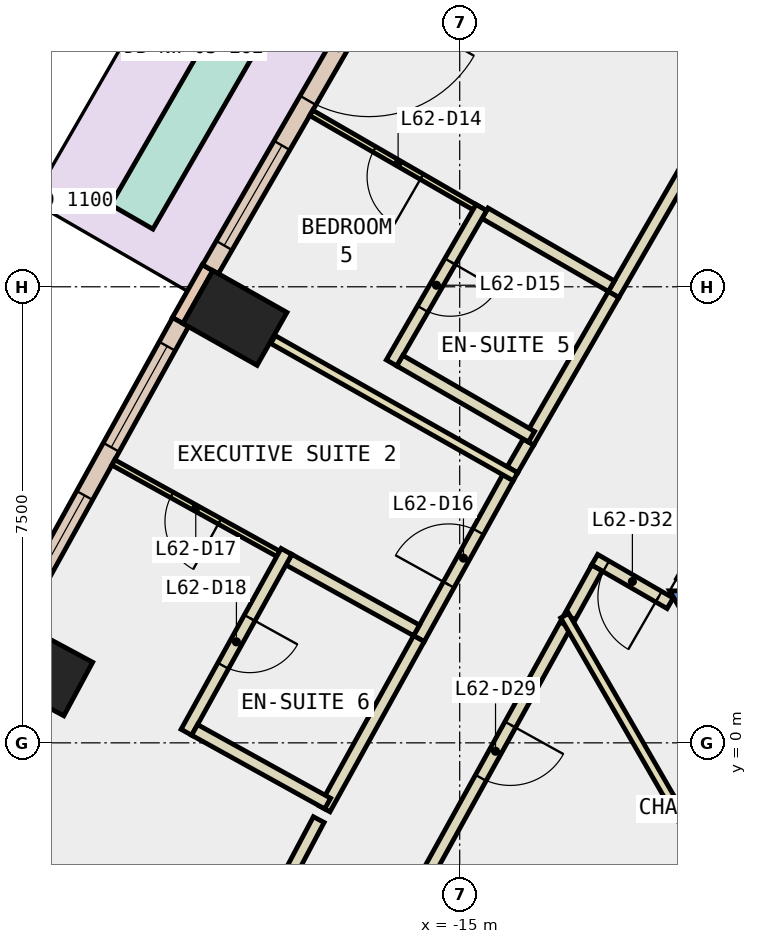
"""IFC4 building model, lengths in metres.
Left out: names, types, materials, properties, quantities, classifications, styles, units other than length and angle.
Written with IfcOpenShell. Run it as: python <this file> out.ifc"""

import sys

from ifc_helpers import new_model, si_unit, direction, frame, frame_2d, origin, origin_2d, place, context, subcontext, project, spatial, polyline, rectangle, outline, extrude, element, fill, save


model = new_model("IFC4")
c1 = context("Model", 3, precision=1e-05, world=origin(), true_north=direction((0.0, 1.0)))
c2 = subcontext(c1, "Body", "Model", "MODEL_VIEW")
j1 = project(units=[si_unit("LENGTHUNIT", "METRE"), si_unit("PLANEANGLEUNIT", "RADIAN")], contexts=[c1])
p1 = place(None, origin())
s1 = spatial("IfcSite", under=j1, at=p1, CompositionType="ELEMENT")
p2 = place(p1, origin())
s2 = spatial("IfcBuilding", under=s1, at=p2, CompositionType="ELEMENT")
p3 = place(p2, frame((0.0, 0.0, 270.2)))
s3 = spatial("IfcBuildingStorey", under=s2, at=p3, CompositionType="ELEMENT", Elevation=270.2)
for number, where, z_axis, x_axis in (
    (1, (-18.696, 6.987, -0.34), (0.0, 0.0, 1.0), (0.491, 0.871, 0.0)),
    (2, (-21.89, 1.217, -0.34), (0.0, 0.0, 1.0), (0.474, 0.881, 0.0)),
):
    element("IfcColumn", number, at=place(p3, frame(where, z_axis=z_axis, x_axis=x_axis)), inside=s3, PredefinedType="COLUMN", context=c2, shape_type="SweptSolid", body=[
        extrude(rectangle(XDim=1.0, YDim=1.4, at=origin_2d()), origin(), (0.0, 0.0, 1.0), 3.6),
    ])
p4 = place(p3, frame((0.0, 0.0, -0.34)))
e3 = element("IfcWall", 3, at=p4, inside=s3, PredefinedType="SHEAR", context=c2, shape_type="SweptSolid", body=[
    extrude(outline(polyline([(-11.547, 2.5), (-5.774, -7.5), (-5.427, -6.9), (-10.854, 2.5), (-11.547, 2.5)])), origin(), (0.0, 0.0, 1.0), 3.6),
])
p5 = place(p3, frame((-19.147, 7.815, 0.0), z_axis=(0.0, 0.0, 1.0), x_axis=(-0.491848119507, -0.870681013539, 0.0)))
e4 = element("IfcWall", 4, at=p5, inside=s3, PredefinedType="STANDARD", context=c2, shape_type="SweptSolid", body=[
    extrude(rectangle(XDim=1.0, YDim=0.2, at=frame_2d((0.5, 0.0))), origin(), (0.0, 0.0, 1.0), 3.26),
])
p6 = place(p3, frame((-16.294, 12.647, 0.0), z_axis=(0.0, 0.0, 1.0), x_axis=(-0.500041292042, -0.866001562501, 0.0)))
e5 = element("IfcWall", 5, at=p6, inside=s3, PredefinedType="STANDARD", context=c2, shape_type="SweptSolid", body=[
    extrude(rectangle(XDim=5.612, YDim=0.3, at=frame_2d((2.806, 0.0))), origin(), (0.0, 0.0, 1.0), 3.26),
])
p7 = place(p6, frame((0.403, 0.0, 0.0)))
e6 = element("IfcOpeningElement", 6, at=p7, cuts=e5, PredefinedType="OPENING", context=c2, shape_type="SweptSolid", body=[
    extrude(rectangle(XDim=2.0, YDim=2.4, at=frame_2d((1.0, 1.2))), frame((0.0, 0.16, 0.0), z_axis=(0.0, -1.0, 0.0), x_axis=(1.0, 0.0, 0.0)), (0.0, 0.0, 1.0), 0.32),
])
p8 = place(p6, frame((3.259, 0.0, 0.9)))
e7 = element("IfcOpeningElement", 7, at=p8, cuts=e5, PredefinedType="OPENING", context=c2, shape_type="SweptSolid", body=[
    extrude(rectangle(XDim=1.9, YDim=2.0, at=frame_2d((0.95, 1.0))), frame((0.0, 0.16, 0.0), z_axis=(0.0, -1.0, 0.0), x_axis=(1.0, 0.0, 0.0)), (0.0, 0.0, 1.0), 0.32),
])
p9 = place(p3, frame((-19.591, 6.919, 0.0), z_axis=(0.0, 0.0, 1.0), x_axis=(-0.484260568952, -0.874923826032, 0.0)))
e8 = element("IfcWall", 8, at=p9, inside=s3, PredefinedType="STANDARD", context=c2, shape_type="SweptSolid", body=[
    extrude(rectangle(XDim=5.611, YDim=0.3, at=frame_2d((2.805, 0.0))), origin(), (0.0, 0.0, 1.0), 3.26),
])
p10 = place(p9, frame((0.453, 0.0, 0.9)))
e9 = element("IfcOpeningElement", 9, at=p10, cuts=e8, PredefinedType="OPENING", context=c2, shape_type="SweptSolid", body=[
    extrude(rectangle(XDim=1.9, YDim=2.0, at=frame_2d((0.95, 1.0))), frame((0.0, 0.16, 0.0), z_axis=(0.0, -1.0, 0.0), x_axis=(1.0, 0.0, 0.0)), (0.0, 0.0, 1.0), 0.32),
])
p11 = place(p9, frame((3.258, 0.0, 0.9)))
e10 = element("IfcOpeningElement", 10, at=p11, cuts=e8, PredefinedType="OPENING", context=c2, shape_type="SweptSolid", body=[
    extrude(rectangle(XDim=1.9, YDim=2.0, at=frame_2d((0.95, 1.0))), frame((0.0, 0.16, 0.0), z_axis=(0.0, -1.0, 0.0), x_axis=(1.0, 0.0, 0.0)), (0.0, 0.0, 1.0), 0.32),
])
p12 = place(p3, frame((-17.686, 13.335, 0.0), z_axis=(0.0, 0.0, 1.0), x_axis=(-0.500079142514, -0.865979706011, 0.0)))
e11 = element("IfcWall", 11, at=p12, inside=s3, PredefinedType="STANDARD", context=c2, shape_type="SweptSolid", body=[
    extrude(rectangle(XDim=5.411, YDim=0.8, at=frame_2d((2.706, 0.0))), origin(), (0.0, 0.0, 1.0), 0.8),
])
p13 = place(p3, frame((-11.539, 2.295, 0.0), z_axis=(0.0, 0.0, 1.0), x_axis=(-0.866023989838, 0.500002449018, 0.0)))
e12 = element("IfcWall", 12, at=p13, inside=s3, PredefinedType="PARTITIONING", context=c2, shape_type="SweptSolid", body=[
    extrude(rectangle(XDim=1.434, YDim=0.2, at=frame_2d((0.717, 0.0))), origin(), (0.0, 0.0, 1.0), 3.26),
])
p14 = place(p13, frame((0.217, 0.0, 0.0)))
e13 = element("IfcOpeningElement", 13, at=p14, cuts=e12, PredefinedType="OPENING", context=c2, shape_type="SweptSolid", body=[
    extrude(rectangle(XDim=1.0, YDim=2.1, at=frame_2d((0.5, 1.05))), frame((0.0, 0.11, 0.0), z_axis=(0.0, -1.0, 0.0), x_axis=(1.0, 0.0, 0.0)), (0.0, 0.0, 1.0), 0.22),
])
p15 = place(p3, frame((-12.743, 2.875, 0.0), z_axis=(0.0, 0.0, 1.0), x_axis=(-0.484334040176, -0.8748831565, 0.0)))
e14 = element("IfcWall", 14, at=p15, inside=s3, PredefinedType="PARTITIONING", context=c2, shape_type="SweptSolid", body=[
    extrude(rectangle(XDim=0.919, YDim=0.2, at=frame_2d((0.459, 0.0))), origin(), (0.0, 0.0, 1.0), 3.26),
])
p16 = place(p3, frame((-13.261, 1.939, 0.0), z_axis=(0.0, 0.0, 1.0), x_axis=(-0.484323615817, -0.874888927329, 0.0)))
e15 = element("IfcWall", 15, at=p16, inside=s3, PredefinedType="PARTITIONING", context=c2, shape_type="SweptSolid", body=[
    extrude(rectangle(XDim=4.747, YDim=0.2, at=frame_2d((2.374, 0.0))), origin(), (0.0, 0.0, 1.0), 3.26),
])
p17 = place(p16, frame((1.874, 0.0, 0.0)))
e16 = element("IfcOpeningElement", 16, at=p17, cuts=e15, PredefinedType="OPENING", context=c2, shape_type="SweptSolid", body=[
    extrude(rectangle(XDim=1.0, YDim=2.1, at=frame_2d((0.5, 1.05))), frame((0.0, 0.11, 0.0), z_axis=(0.0, -1.0, 0.0), x_axis=(1.0, 0.0, 0.0)), (0.0, 0.0, 1.0), 0.22),
])
p18 = place(p3, frame((-12.469, 7.373, 0.0), z_axis=(0.0, 0.0, 1.0), x_axis=(0.500129289791, 0.86595074542, 0.0)))
e17 = element("IfcWall", 17, at=p18, inside=s3, PredefinedType="PARTITIONING", context=c2, shape_type="SweptSolid", body=[
    extrude(rectangle(XDim=3.099, YDim=0.2, at=frame_2d((1.55, 0.0))), origin(), (0.0, 0.0, 1.0), 3.26),
])
p19 = place(p3, frame((-14.132, 4.492, 0.0), z_axis=(0.0, 0.0, 1.0), x_axis=(0.499829488579, 0.86612382622, 0.0)))
e18 = element("IfcWall", 18, at=p19, inside=s3, PredefinedType="PARTITIONING", context=c2, shape_type="SweptSolid", body=[
    extrude(rectangle(XDim=0.527, YDim=0.2, at=frame_2d((0.263, 0.0))), origin(), (0.0, 0.0, 1.0), 3.26),
])
p20 = place(p3, frame((-13.869, 4.948, 0.0), z_axis=(0.0, 0.0, 1.0), x_axis=(0.49994636267, 0.866056369097, 0.0)))
e19 = element("IfcWall", 19, at=p20, inside=s3, PredefinedType="PARTITIONING", context=c2, shape_type="SweptSolid", body=[
    extrude(rectangle(XDim=2.8, YDim=0.2, at=frame_2d((1.4, 0.0))), origin(), (0.0, 0.0, 1.0), 3.26),
])
p21 = place(p3, frame((-15.671, 1.714, 0.0), z_axis=(0.0, 0.0, 1.0), x_axis=(0.484203367026, 0.874955484216, 0.0)))
e20 = element("IfcWall", 20, at=p21, inside=s3, PredefinedType="PARTITIONING", context=c2, shape_type="SweptSolid", body=[
    extrude(rectangle(XDim=3.025, YDim=0.2, at=frame_2d((1.513, 0.0))), origin(), (0.0, 0.0, 1.0), 3.26),
])
p22 = place(p21, frame((1.013, 0.0, 0.0)))
e21 = element("IfcOpeningElement", 21, at=p22, cuts=e20, PredefinedType="OPENING", context=c2, shape_type="SweptSolid", body=[
    extrude(rectangle(XDim=1.0, YDim=2.1, at=frame_2d((0.5, 1.05))), frame((0.0, 0.11, 0.0), z_axis=(0.0, -1.0, 0.0), x_axis=(1.0, 0.0, 0.0)), (0.0, 0.0, 1.0), 0.22),
])
p23 = place(p3, frame((-20.229, -6.754, 0.0), z_axis=(0.0, 0.0, 1.0), x_axis=(0.468313568794, 0.883562335822, 0.0)))
e22 = element("IfcWall", 22, at=p23, inside=s3, PredefinedType="PARTITIONING", context=c2, shape_type="SweptSolid", body=[
    extrude(rectangle(XDim=6.216, YDim=0.2, at=frame_2d((3.108, 0.0))), origin(), (0.0, 0.0, 1.0), 3.26),
])
p24 = place(p3, frame((-17.221, -1.085, 0.0), z_axis=(0.0, 0.0, 1.0), x_axis=(0.48445041864, 0.874818719438, 0.0)))
e23 = element("IfcWall", 23, at=p24, inside=s3, PredefinedType="PARTITIONING", context=c2, shape_type="SweptSolid", body=[
    extrude(rectangle(XDim=3.2, YDim=0.2, at=frame_2d((1.6, 0.0))), origin(), (0.0, 0.0, 1.0), 3.26),
])
p25 = place(p3, frame((-13.274, 2.092, 0.0), z_axis=(0.0, 0.0, 1.0), x_axis=(0.500002592159, -0.866023907196, 0.0)))
e24 = element("IfcWall", 24, at=p25, inside=s3, PredefinedType="PARTITIONING", context=c2, shape_type="SweptSolid", body=[
    extrude(rectangle(XDim=6.538, YDim=0.15, at=frame_2d((3.269, 0.0))), origin(), (0.0, 0.0, 1.0), 3.26),
])
p26 = place(p3, frame((-14.584, 8.71, 0.0), z_axis=(0.0, 0.0, 1.0), x_axis=(-0.866008176907, 0.50002983664, 0.0)))
e25 = element("IfcWall", 25, at=p26, inside=s3, PredefinedType="PARTITIONING", context=c2, shape_type="SweptSolid", body=[
    extrude(rectangle(XDim=3.3, YDim=0.1, at=frame_2d((1.65, 0.0))), origin(), (0.0, 0.0, 1.0), 3.26),
])
p27 = place(p26, frame((1.2, 0.0, 0.0)))
e26 = element("IfcOpeningElement", 26, at=p27, cuts=e25, PredefinedType="OPENING", context=c2, shape_type="SweptSolid", body=[
    extrude(rectangle(XDim=0.9, YDim=2.1, at=frame_2d((0.45, 1.05))), frame((0.0, 0.06, 0.0), z_axis=(0.0, -1.0, 0.0), x_axis=(1.0, 0.0, 0.0)), (0.0, 0.0, 1.0), 0.12),
])
p28 = place(p3, frame((-12.505, 7.51, 0.0), z_axis=(0.0, 0.0, 1.0), x_axis=(-0.866277021052, 0.499563932643, 0.0)))
e27 = element("IfcWall", 27, at=p28, inside=s3, PredefinedType="PARTITIONING", context=c2, shape_type="SweptSolid", body=[
    extrude(rectangle(XDim=2.4, YDim=0.2, at=frame_2d((1.2, 0.0))), origin(), (0.0, 0.0, 1.0), 3.26),
])
p29 = place(p3, frame((-14.645, 8.803, 0.0), z_axis=(0.0, 0.0, 1.0), x_axis=(-0.500001826776, -0.866024349092, 0.0)))
e28 = element("IfcWall", 28, at=p29, inside=s3, PredefinedType="PARTITIONING", context=c2, shape_type="SweptSolid", body=[
    extrude(rectangle(XDim=2.95, YDim=0.2, at=frame_2d((1.475, 0.0))), origin(), (0.0, 0.0, 1.0), 3.26),
])
p30 = place(p29, frame((1.025, 0.0, 0.0)))
e29 = element("IfcOpeningElement", 29, at=p30, cuts=e28, PredefinedType="OPENING", context=c2, shape_type="SweptSolid", body=[
    extrude(rectangle(XDim=0.9, YDim=2.1, at=frame_2d((0.45, 1.05))), frame((0.0, 0.11, 0.0), z_axis=(0.0, -1.0, 0.0), x_axis=(1.0, 0.0, 0.0)), (0.0, 0.0, 1.0), 0.22),
])
p31 = place(p3, frame((-15.984, 6.285, 0.0), z_axis=(0.0, 0.0, 1.0), x_axis=(0.865998541277, -0.500046524342, 0.0)))
e30 = element("IfcWall", 30, at=p31, inside=s3, PredefinedType="PARTITIONING", context=c2, shape_type="SweptSolid", body=[
    extrude(rectangle(XDim=2.5, YDim=0.2, at=frame_2d((1.25, 0.0))), origin(), (0.0, 0.0, 1.0), 3.26),
])
p32 = place(p3, frame((-14.083, 4.377, 0.0), z_axis=(0.0, 0.0, 1.0), x_axis=(-0.870415885751, 0.492317159799, 0.0)))
e31 = element("IfcWall", 31, at=p32, inside=s3, PredefinedType="PARTITIONING", context=c2, shape_type="SweptSolid", body=[
    extrude(rectangle(XDim=4.581, YDim=0.15, at=frame_2d((2.29, 0.0))), origin(), (0.0, 0.0, 1.0), 3.26),
])
p33 = place(p3, frame((-17.985, 3.109, 0.0), z_axis=(0.0, 0.0, 1.0), x_axis=(-0.874762085098, 0.484552674614, 0.0)))
e32 = element("IfcWall", 32, at=p33, inside=s3, PredefinedType="PARTITIONING", context=c2, shape_type="SweptSolid", body=[
    extrude(rectangle(XDim=3.1, YDim=0.1, at=frame_2d((1.55, 0.0))), origin(), (0.0, 0.0, 1.0), 3.26),
])
p34 = place(p33, frame((1.1, 0.0, 0.0)))
e33 = element("IfcOpeningElement", 33, at=p34, cuts=e32, PredefinedType="OPENING", context=c2, shape_type="SweptSolid", body=[
    extrude(rectangle(XDim=0.9, YDim=2.1, at=frame_2d((0.45, 1.05))), frame((0.0, 0.06, 0.0), z_axis=(0.0, -1.0, 0.0), x_axis=(1.0, 0.0, 0.0)), (0.0, 0.0, 1.0), 0.12),
])
p35 = place(p3, frame((-15.71, 1.85, 0.0), z_axis=(0.0, 0.0, 1.0), x_axis=(-0.874842414173, 0.484407628308, 0.0)))
e34 = element("IfcWall", 34, at=p35, inside=s3, PredefinedType="PARTITIONING", context=c2, shape_type="SweptSolid", body=[
    extrude(rectangle(XDim=2.401, YDim=0.2, at=frame_2d((1.2, 0.0))), origin(), (0.0, 0.0, 1.0), 3.26),
])
p36 = place(p3, frame((-17.849, 3.148, 0.0), z_axis=(0.0, 0.0, 1.0), x_axis=(-0.484257957482, -0.874925271446, 0.0)))
e35 = element("IfcWall", 35, at=p36, inside=s3, PredefinedType="PARTITIONING", context=c2, shape_type="SweptSolid", body=[
    extrude(rectangle(XDim=3.399, YDim=0.2, at=frame_2d((1.699, 0.0))), origin(), (0.0, 0.0, 1.0), 3.26),
])
p37 = place(p36, frame((1.25, 0.0, 0.0)))
e36 = element("IfcOpeningElement", 36, at=p37, cuts=e35, PredefinedType="OPENING", context=c2, shape_type="SweptSolid", body=[
    extrude(rectangle(XDim=0.9, YDim=2.1, at=frame_2d((0.45, 1.05))), frame((0.0, 0.11, 0.0), z_axis=(0.0, -1.0, 0.0), x_axis=(1.0, 0.0, 0.0)), (0.0, 0.0, 1.0), 0.22),
])
p38 = place(p3, frame((-19.36, 0.213, 0.0), z_axis=(0.0, 0.0, 1.0), x_axis=(0.874939003568, -0.484233146362, 0.0)))
e37 = element("IfcWall", 37, at=p38, inside=s3, PredefinedType="PARTITIONING", context=c2, shape_type="SweptSolid", body=[
    extrude(rectangle(XDim=2.501, YDim=0.2, at=frame_2d((1.25, 0.0))), origin(), (0.0, 0.0, 1.0), 3.26),
])
p39 = place(p3, frame((-10.449, 4.203, 0.0), z_axis=(0.0, 0.0, 1.0), x_axis=(-0.499914839587, -0.866074565589, 0.0)))
e38 = element("IfcWall", 38, at=p39, inside=s3, PredefinedType="PARTITIONING", context=c2, shape_type="SweptSolid", body=[
    extrude(rectangle(XDim=1.794, YDim=0.2, at=frame_2d((0.897, 0.0))), origin(), (0.0, 0.0, 1.0), 2.4),
])
p40 = place(p39, frame((0.397, 0.0, 0.0)))
e39 = element("IfcOpeningElement", 39, at=p40, cuts=e38, PredefinedType="OPENING", context=c2, shape_type="SweptSolid", body=[
    extrude(rectangle(XDim=1.0, YDim=2.1, at=frame_2d((0.5, 1.05))), frame((0.0, 0.11, 0.0), z_axis=(0.0, -1.0, 0.0), x_axis=(1.0, 0.0, 0.0)), (0.0, 0.0, 1.0), 0.22),
])
p41 = place(p7, origin())
e40 = element("IfcDoor", 40, at=p41, inside=s3, OperationType="SLIDING_TO_LEFT", PredefinedType="DOOR", context=c2, shape_type="SweptSolid", body=[
    extrude(rectangle(XDim=2.0, YDim=2.4, at=frame_2d((1.0, 1.2))), frame((0.0, 0.025, 0.0), z_axis=(0.0, -1.0, 0.0), x_axis=(1.0, 0.0, 0.0)), (0.0, 0.0, 1.0), 0.05),
])
fill(e6, e40)
p42 = place(p8, origin())
e41 = element("IfcWindow", 41, at=p42, inside=s3, PartitioningType="SINGLE_PANEL", PredefinedType="WINDOW", context=c2, shape_type="SweptSolid", body=[
    extrude(rectangle(XDim=1.9, YDim=2.0, at=frame_2d((0.95, 1.0))), frame((0.0, 0.03, 0.0), z_axis=(0.0, -1.0, 0.0), x_axis=(1.0, 0.0, 0.0)), (0.0, 0.0, 1.0), 0.06),
])
fill(e7, e41)
p43 = place(p10, origin())
e42 = element("IfcWindow", 42, at=p43, inside=s3, PartitioningType="SINGLE_PANEL", PredefinedType="WINDOW", context=c2, shape_type="SweptSolid", body=[
    extrude(rectangle(XDim=1.9, YDim=2.0, at=frame_2d((0.95, 1.0))), frame((0.0, 0.03, 0.0), z_axis=(0.0, -1.0, 0.0), x_axis=(1.0, 0.0, 0.0)), (0.0, 0.0, 1.0), 0.06),
])
fill(e9, e42)
p44 = place(p11, origin())
e43 = element("IfcWindow", 43, at=p44, inside=s3, PartitioningType="SINGLE_PANEL", PredefinedType="WINDOW", context=c2, shape_type="SweptSolid", body=[
    extrude(rectangle(XDim=1.9, YDim=2.0, at=frame_2d((0.95, 1.0))), frame((0.0, 0.03, 0.0), z_axis=(0.0, -1.0, 0.0), x_axis=(1.0, 0.0, 0.0)), (0.0, 0.0, 1.0), 0.06),
])
fill(e10, e43)
p45 = place(p27, origin())
e44 = element("IfcDoor", 44, at=p45, inside=s3, OperationType="SINGLE_SWING_LEFT", PredefinedType="DOOR", context=c2, shape_type="SweptSolid", body=[
    extrude(rectangle(XDim=0.9, YDim=2.1, at=frame_2d((0.45, 1.05))), frame((0.0, 0.025, 0.0), z_axis=(0.0, -1.0, 0.0), x_axis=(1.0, 0.0, 0.0)), (0.0, 0.0, 1.0), 0.05),
])
fill(e26, e44)
p46 = place(p30, origin())
e45 = element("IfcDoor", 45, at=p46, inside=s3, OperationType="SINGLE_SWING_LEFT", PredefinedType="DOOR", context=c2, shape_type="SweptSolid", body=[
    extrude(rectangle(XDim=0.9, YDim=2.1, at=frame_2d((0.45, 1.05))), frame((0.0, 0.025, 0.0), z_axis=(0.0, -1.0, 0.0), x_axis=(1.0, 0.0, 0.0)), (0.0, 0.0, 1.0), 0.05),
])
fill(e29, e45)
p47 = place(p22, origin())
e46 = element("IfcDoor", 46, at=p47, inside=s3, OperationType="SINGLE_SWING_RIGHT", PredefinedType="DOOR", context=c2, shape_type="SweptSolid", body=[
    extrude(rectangle(XDim=1.0, YDim=2.1, at=frame_2d((0.5, 1.05))), frame((0.0, 0.025, 0.0), z_axis=(0.0, -1.0, 0.0), x_axis=(1.0, 0.0, 0.0)), (0.0, 0.0, 1.0), 0.05),
])
fill(e21, e46)
p48 = place(p34, origin())
e47 = element("IfcDoor", 47, at=p48, inside=s3, OperationType="SINGLE_SWING_LEFT", PredefinedType="DOOR", context=c2, shape_type="SweptSolid", body=[
    extrude(rectangle(XDim=0.9, YDim=2.1, at=frame_2d((0.45, 1.05))), frame((0.0, 0.025, 0.0), z_axis=(0.0, -1.0, 0.0), x_axis=(1.0, 0.0, 0.0)), (0.0, 0.0, 1.0), 0.05),
])
fill(e33, e47)
p49 = place(p37, origin())
e48 = element("IfcDoor", 48, at=p49, inside=s3, OperationType="SINGLE_SWING_LEFT", PredefinedType="DOOR", context=c2, shape_type="SweptSolid", body=[
    extrude(rectangle(XDim=0.9, YDim=2.1, at=frame_2d((0.45, 1.05))), frame((0.0, 0.025, 0.0), z_axis=(0.0, -1.0, 0.0), x_axis=(1.0, 0.0, 0.0)), (0.0, 0.0, 1.0), 0.05),
])
fill(e36, e48)
p50 = place(p17, origin())
e49 = element("IfcDoor", 49, at=p50, inside=s3, OperationType="SINGLE_SWING_LEFT", PredefinedType="DOOR", context=c2, shape_type="SweptSolid", body=[
    extrude(rectangle(XDim=1.0, YDim=2.1, at=frame_2d((0.5, 1.05))), frame((0.0, 0.025, 0.0), z_axis=(0.0, -1.0, 0.0), x_axis=(1.0, 0.0, 0.0)), (0.0, 0.0, 1.0), 0.05),
])
fill(e16, e49)
p51 = place(p14, origin())
e50 = element("IfcDoor", 50, at=p51, inside=s3, OperationType="SINGLE_SWING_RIGHT", PredefinedType="DOOR", context=c2, shape_type="SweptSolid", body=[
    extrude(rectangle(XDim=1.0, YDim=2.1, at=frame_2d((0.5, 1.05))), frame((0.0, 0.025, 0.0), z_axis=(0.0, -1.0, 0.0), x_axis=(1.0, 0.0, 0.0)), (0.0, 0.0, 1.0), 0.05),
])
fill(e13, e50)
save(model, sys.argv[1])
